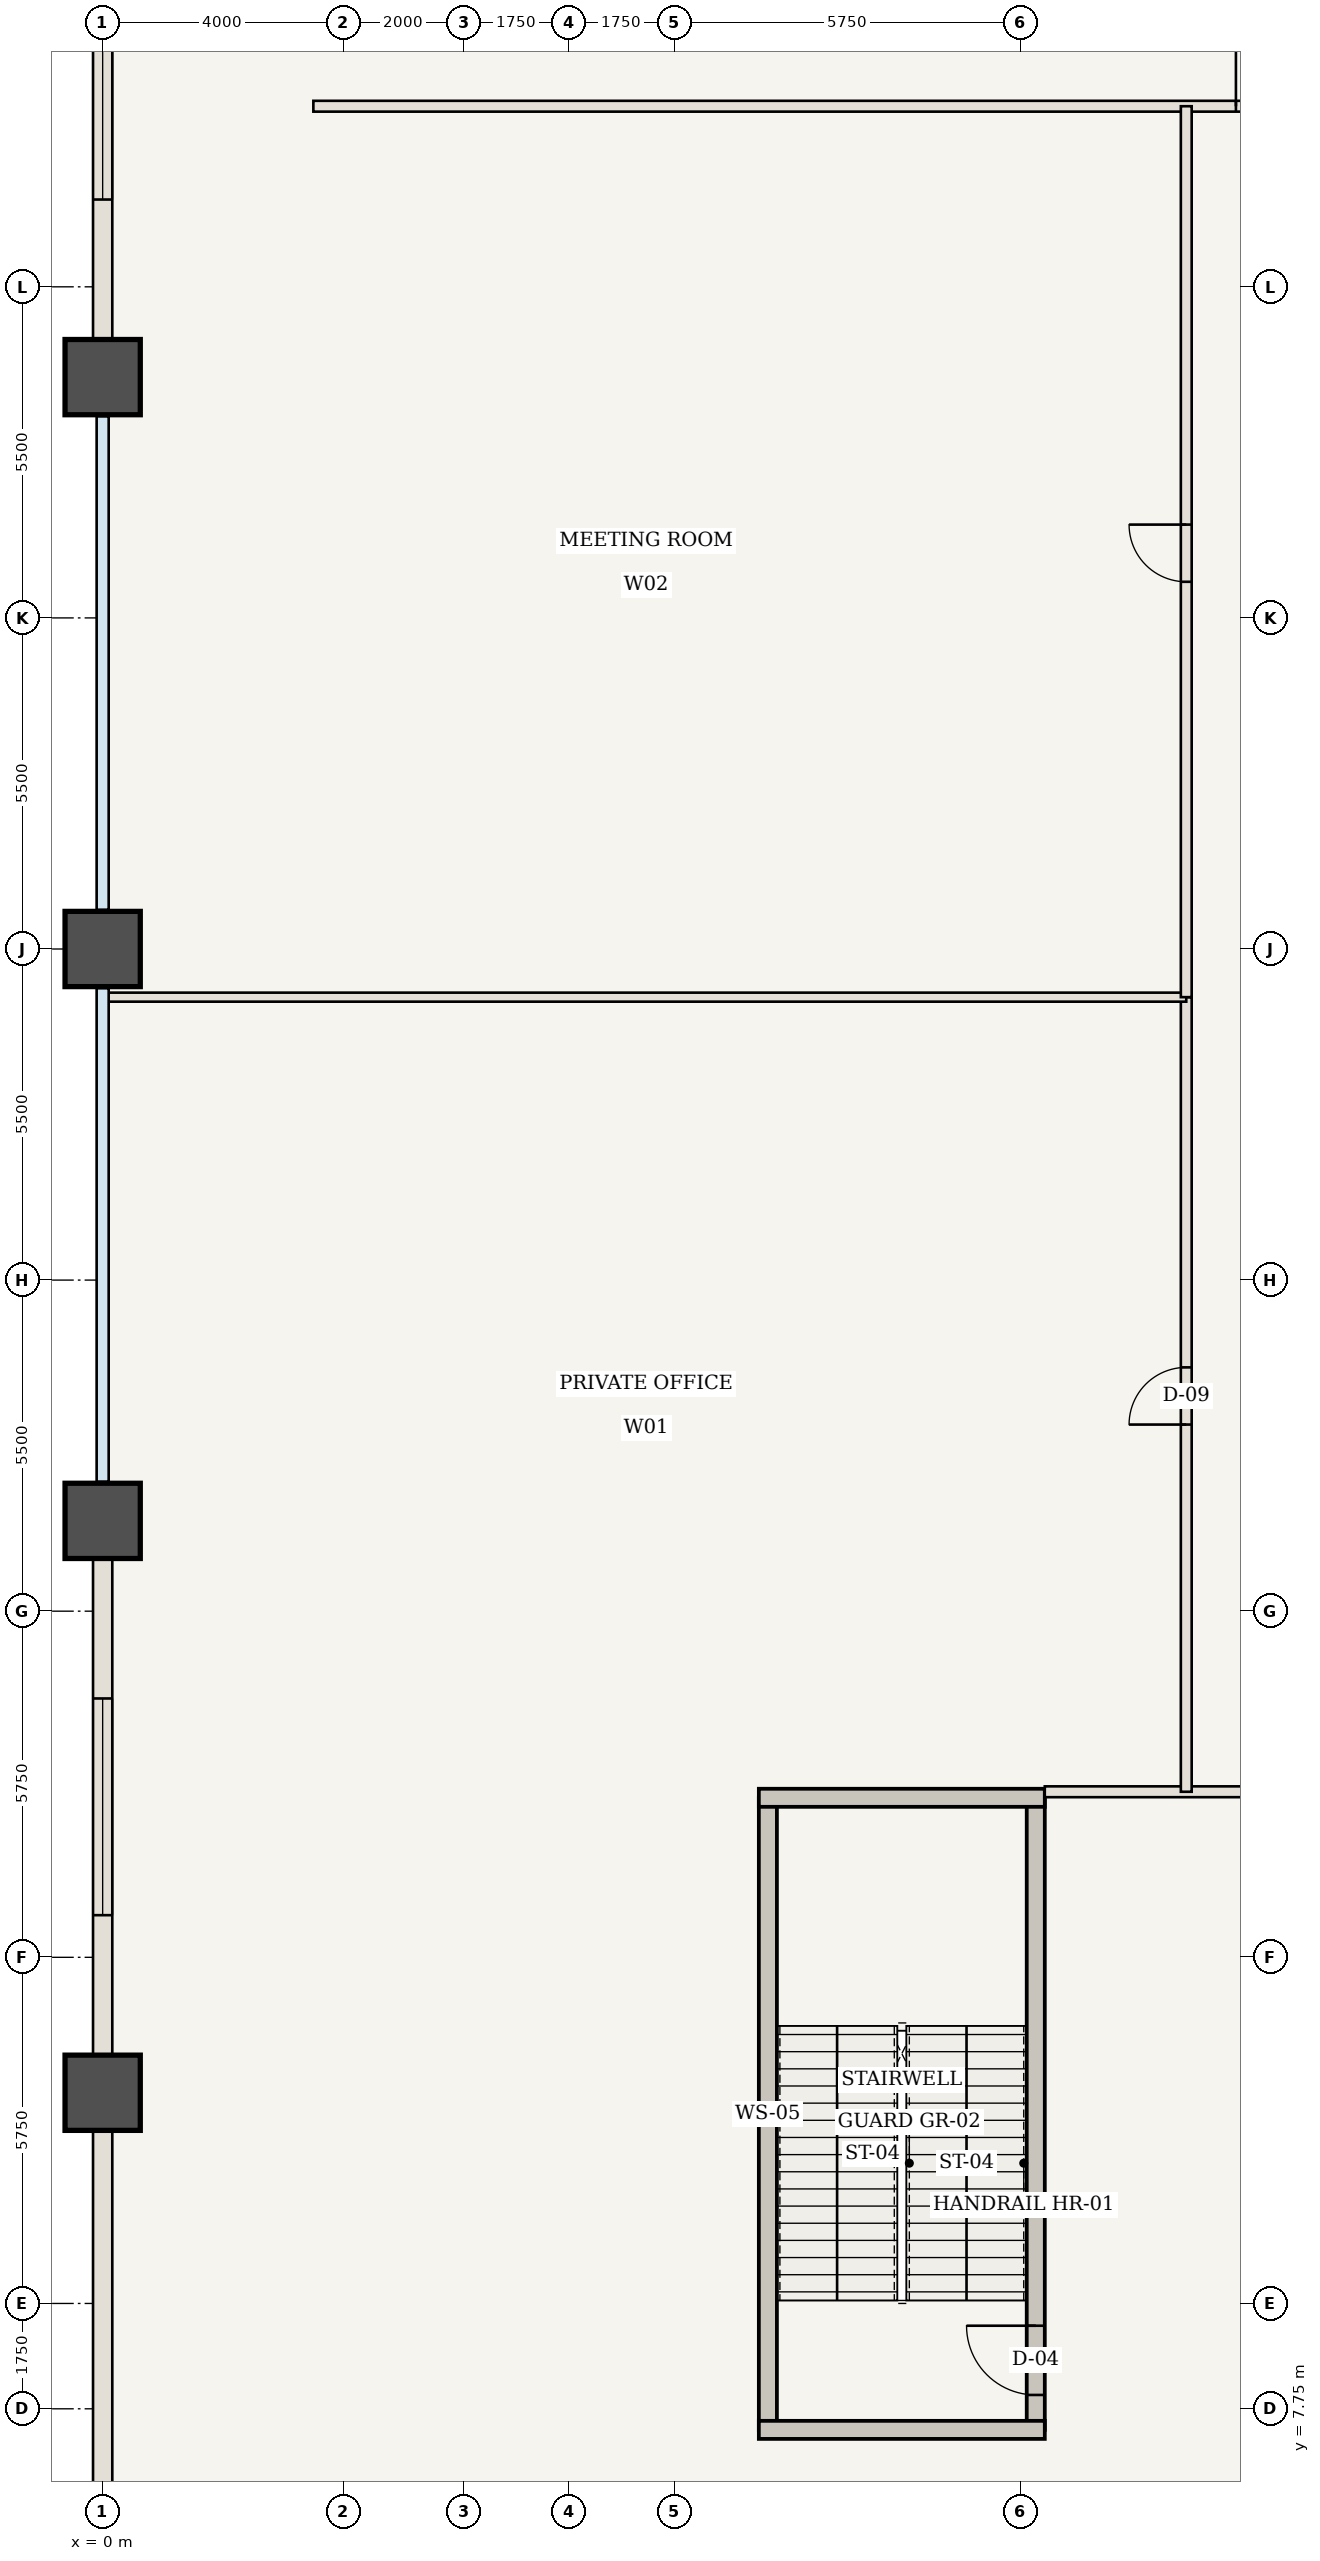
"""IFC4 building model, lengths in metres.
Left out: names, types, materials, properties, quantities, classifications, styles, units other than length and angle.
Written with IfcOpenShell. Run it as: python <this file> out.ifc"""

import sys

from ifc_helpers import new_model, si_unit, direction, frame, frame_2d, origin, origin_2d, place, context, subcontext, project, spatial, rectangle, extrude, element, fill, save


model = new_model("IFC4")
c1 = context("Model", 3, precision=1e-05, world=origin(), true_north=direction((0.0, 1.0)))
c2 = subcontext(c1, "Body", "Model", "MODEL_VIEW")
j1 = project(units=[si_unit("LENGTHUNIT", "METRE"), si_unit("PLANEANGLEUNIT", "RADIAN")], contexts=[c1])
p1 = place(None, origin())
s1 = spatial("IfcSite", under=j1, at=p1, CompositionType="ELEMENT")
p2 = place(p1, origin())
s2 = spatial("IfcBuilding", under=s1, at=p2, CompositionType="ELEMENT")
p3 = place(p2, frame((0.0, 0.0, 17.85)))
s3 = spatial("IfcBuildingStorey", under=s2, at=p3, CompositionType="ELEMENT", Elevation=17.85)
for number, where, z_axis, x_axis in (
    (1, (0.0, 13.0, 0.0), (0.0, 0.0, 1.0), (1.0, 0.0, 0.0)),
    (2, (0.0, 22.5, 0.0), (0.0, 0.0, 1.0), (1.0, 0.0, 0.0)),
    (3, (0.0, 32.0, 0.0), (0.0, 0.0, 1.0), (1.0, 0.0, 0.0)),
    (4, (0.0, 41.5, 0.0), (0.0, 0.0, 1.0), (1.0, 0.0, 0.0)),
):
    element("IfcColumn", number, at=place(p3, frame(where, z_axis=z_axis, x_axis=x_axis)), inside=s3, PredefinedType="COLUMN", context=c2, shape_type="SweptSolid", body=[
        extrude(rectangle(XDim=1.25, YDim=1.25, at=origin_2d()), origin(), (0.0, 0.0, 1.0), 5.95),
    ])
p4 = place(p3, frame((11.05, 7.4, 0.0), z_axis=(0.0, 0.0, 1.0), x_axis=(0.0, 1.0, 0.0)))
e5 = element("IfcWall", 5, at=p4, inside=s3, PredefinedType="SHEAR", context=c2, shape_type="SweptSolid", body=[
    extrude(rectangle(XDim=10.5, YDim=0.3, at=frame_2d((5.25, 0.0))), origin(), (0.0, 0.0, 1.0), 5.71),
])
p5 = place(p3, frame((15.5, 7.4, 0.0), z_axis=(0.0, 0.0, 1.0), x_axis=(0.0, 1.0, 0.0)))
e6 = element("IfcWall", 6, at=p5, inside=s3, PredefinedType="SHEAR", context=c2, shape_type="SweptSolid", body=[
    extrude(rectangle(XDim=10.5, YDim=0.3, at=frame_2d((5.25, 0.0))), origin(), (0.0, 0.0, 1.0), 5.71),
])
p6 = place(p5, frame((0.58, 0.0, 0.0)))
e7 = element("IfcOpeningElement", 7, at=p6, cuts=e6, PredefinedType="OPENING", context=c2, shape_type="SweptSolid", body=[
    extrude(rectangle(XDim=1.15, YDim=2.15, at=frame_2d((0.575, 1.075))), frame((0.0, 0.16, 0.0), z_axis=(0.0, -1.0, 0.0), x_axis=(1.0, 0.0, 0.0)), (0.0, 0.0, 1.0), 0.32),
])
for number, where, z_axis, x_axis in (
    (8, (10.9, 7.4, 0.0), (0.0, 0.0, 1.0), (1.0, 0.0, 0.0)),
    (9, (10.9, 17.9, 0.0), (0.0, 0.0, 1.0), (1.0, 0.0, 0.0)),
):
    element("IfcWall", number, at=place(p3, frame(where, z_axis=z_axis, x_axis=x_axis)), inside=s3, PredefinedType="SHEAR", context=c2, shape_type="SweptSolid", body=[
        extrude(rectangle(XDim=4.75, YDim=0.3, at=frame_2d((2.375, 0.0))), origin(), (0.0, 0.0, 1.0), 5.71),
    ])
p7 = place(p3, frame((15.65, 18.0, 0.0), z_axis=(0.0, 0.0, 1.0), x_axis=(1.0, 0.0, 0.0)))
e10 = element("IfcWall", 10, at=p7, inside=s3, PredefinedType="STANDARD", context=c2, shape_type="SweptSolid", body=[
    extrude(rectangle(XDim=25.85, YDim=0.18, at=frame_2d((12.925, 0.0))), origin(), (0.0, 0.0, 1.0), 5.71),
])
p8 = place(p7, frame((15.075, 0.0, 0.0)))
e11 = element("IfcOpeningElement", 11, at=p8, cuts=e10, PredefinedType="OPENING", context=c2, shape_type="SweptSolid", body=[
    extrude(rectangle(XDim=1.8, YDim=2.35, at=frame_2d((0.9, 1.175))), frame((0.0, 0.1, 0.0), z_axis=(0.0, -1.0, 0.0), x_axis=(1.0, 0.0, 0.0)), (0.0, 0.0, 1.0), 0.2),
])
p9 = place(p3, frame((3.5, 46.0, 0.0), z_axis=(0.0, 0.0, 1.0), x_axis=(1.0, 0.0, 0.0)))
e12 = element("IfcWall", 12, at=p9, inside=s3, PredefinedType="STANDARD", context=c2, shape_type="SweptSolid", body=[
    extrude(rectangle(XDim=20.0, YDim=0.18, at=frame_2d((10.0, 0.0))), origin(), (0.0, 0.0, 1.0), 5.71),
])
p10 = place(p9, frame((15.325, 0.0, 0.0)))
e13 = element("IfcOpeningElement", 13, at=p10, cuts=e12, PredefinedType="OPENING", context=c2, shape_type="SweptSolid", body=[
    extrude(rectangle(XDim=1.8, YDim=2.35, at=frame_2d((0.9, 1.175))), frame((0.0, 0.1, 0.0), z_axis=(0.0, -1.0, 0.0), x_axis=(1.0, 0.0, 0.0)), (0.0, 0.0, 1.0), 0.2),
])
p11 = place(p3, frame((18.0, 18.0, 0.0), z_axis=(0.0, 0.0, 1.0), x_axis=(0.0, 1.0, 0.0)))
e14 = element("IfcWall", 14, at=p11, inside=s3, PredefinedType="STANDARD", context=c2, shape_type="SweptSolid", body=[
    extrude(rectangle(XDim=13.2, YDim=0.18, at=frame_2d((6.6, 0.0))), origin(), (0.0, 0.0, 1.0), 5.71),
])
p12 = place(p11, frame((6.1, 0.0, 0.0)))
e15 = element("IfcOpeningElement", 15, at=p12, cuts=e14, PredefinedType="OPENING", context=c2, shape_type="SweptSolid", body=[
    extrude(rectangle(XDim=0.95, YDim=2.15, at=frame_2d((0.475, 1.075))), frame((0.0, 0.1, 0.0), z_axis=(0.0, -1.0, 0.0), x_axis=(1.0, 0.0, 0.0)), (0.0, 0.0, 1.0), 0.2),
])
p13 = place(p3, frame((0.06, 31.2, 0.0), z_axis=(0.0, 0.0, 1.0), x_axis=(1.0, 0.0, 0.0)))
e16 = element("IfcWall", 16, at=p13, inside=s3, PredefinedType="STANDARD", context=c2, shape_type="SweptSolid", body=[
    extrude(rectangle(XDim=17.94, YDim=0.15, at=frame_2d((8.97, 0.0))), origin(), (0.0, 0.0, 1.0), 5.71),
])
p14 = place(p3, frame((18.0, 31.2, 0.0), z_axis=(0.0, 0.0, 1.0), x_axis=(0.0, 1.0, 0.0)))
e17 = element("IfcWall", 17, at=p14, inside=s3, PredefinedType="STANDARD", context=c2, shape_type="SweptSolid", body=[
    extrude(rectangle(XDim=14.8, YDim=0.18, at=frame_2d((7.4, 0.0))), origin(), (0.0, 0.0, 1.0), 5.71),
])
p15 = place(p14, frame((6.9, 0.0, 0.0)))
e18 = element("IfcOpeningElement", 18, at=p15, cuts=e17, PredefinedType="OPENING", context=c2, shape_type="SweptSolid", body=[
    extrude(rectangle(XDim=0.95, YDim=2.15, at=frame_2d((0.475, 1.075))), frame((0.0, 0.1, 0.0), z_axis=(0.0, -1.0, 0.0), x_axis=(1.0, 0.0, 0.0)), (0.0, 0.0, 1.0), 0.2),
])
p16 = place(p3, frame((0.0, 3.5, 0.0), z_axis=(0.0, 0.0, 1.0), x_axis=(0.0, 1.0, 0.0)))
e19 = element("IfcWall", 19, at=p16, inside=s3, PredefinedType="USERDEFINED", context=c2, shape_type="SweptSolid", body=[
    extrude(rectangle(XDim=9.5, YDim=0.32, at=frame_2d((4.75, 0.0))), origin(), (0.0, 0.0, 1.0), 4.81),
])
p17 = place(p3, frame((0.0, 13.0, 0.0), z_axis=(0.0, 0.0, 1.0), x_axis=(0.0, 1.0, 0.0)))
e20 = element("IfcWall", 20, at=p17, inside=s3, PredefinedType="USERDEFINED", context=c2, shape_type="SweptSolid", body=[
    extrude(rectangle(XDim=9.5, YDim=0.32, at=frame_2d((4.75, 0.0))), origin(), (0.0, 0.0, 1.0), 4.81),
])
p18 = place(p17, frame((2.95, 0.0, 0.85)))
e21 = element("IfcOpeningElement", 21, at=p18, cuts=e20, PredefinedType="OPENING", context=c2, shape_type="SweptSolid", body=[
    extrude(rectangle(XDim=3.6, YDim=2.6, at=frame_2d((1.8, 1.3))), frame((0.0, 0.17, 0.0), z_axis=(0.0, -1.0, 0.0), x_axis=(1.0, 0.0, 0.0)), (0.0, 0.0, 1.0), 0.34),
])
p19 = place(p3, frame((0.0, 41.5, 0.0), z_axis=(0.0, 0.0, 1.0), x_axis=(0.0, 1.0, 0.0)))
e22 = element("IfcWall", 22, at=p19, inside=s3, PredefinedType="USERDEFINED", context=c2, shape_type="SweptSolid", body=[
    extrude(rectangle(XDim=9.5, YDim=0.32, at=frame_2d((4.75, 0.0))), origin(), (0.0, 0.0, 1.0), 4.81),
])
p20 = place(p19, frame((2.95, 0.0, 0.85)))
e23 = element("IfcOpeningElement", 23, at=p20, cuts=e22, PredefinedType="OPENING", context=c2, shape_type="SweptSolid", body=[
    extrude(rectangle(XDim=3.6, YDim=2.6, at=frame_2d((1.8, 1.3))), frame((0.0, 0.17, 0.0), z_axis=(0.0, -1.0, 0.0), x_axis=(1.0, 0.0, 0.0)), (0.0, 0.0, 1.0), 0.34),
])
p21 = place(p6, origin())
e24 = element("IfcDoor", 24, at=p21, inside=s3, OperationType="SINGLE_SWING_RIGHT", PredefinedType="DOOR", context=c2, shape_type="SweptSolid", body=[
    extrude(rectangle(XDim=1.15, YDim=2.15, at=frame_2d((0.575, 1.075))), frame((0.0, 0.025, 0.0), z_axis=(0.0, -1.0, 0.0), x_axis=(1.0, 0.0, 0.0)), (0.0, 0.0, 1.0), 0.05),
])
fill(e7, e24)
p22 = place(p10, origin())
e25 = element("IfcDoor", 25, at=p22, inside=s3, OperationType="SINGLE_SWING_LEFT", PredefinedType="DOOR", context=c2, shape_type="SweptSolid", body=[
    extrude(rectangle(XDim=1.8, YDim=2.35, at=frame_2d((0.9, 1.175))), frame((0.0, 0.025, 0.0), z_axis=(0.0, -1.0, 0.0), x_axis=(1.0, 0.0, 0.0)), (0.0, 0.0, 1.0), 0.05),
])
fill(e13, e25)
p23 = place(p12, origin())
e26 = element("IfcDoor", 26, at=p23, inside=s3, OperationType="SINGLE_SWING_LEFT", PredefinedType="DOOR", context=c2, shape_type="SweptSolid", body=[
    extrude(rectangle(XDim=0.95, YDim=2.15, at=frame_2d((0.475, 1.075))), frame((0.0, 0.025, 0.0), z_axis=(0.0, -1.0, 0.0), x_axis=(1.0, 0.0, 0.0)), (0.0, 0.0, 1.0), 0.05),
])
fill(e15, e26)
p24 = place(p15, origin())
e27 = element("IfcDoor", 27, at=p24, inside=s3, OperationType="SINGLE_SWING_RIGHT", PredefinedType="DOOR", context=c2, shape_type="SweptSolid", body=[
    extrude(rectangle(XDim=0.95, YDim=2.15, at=frame_2d((0.475, 1.075))), frame((0.0, 0.025, 0.0), z_axis=(0.0, -1.0, 0.0), x_axis=(1.0, 0.0, 0.0)), (0.0, 0.0, 1.0), 0.05),
])
fill(e18, e27)
p25 = place(p18, origin())
e28 = element("IfcWindow", 28, at=p25, inside=s3, PartitioningType="SINGLE_PANEL", PredefinedType="WINDOW", context=c2, shape_type="SweptSolid", body=[
    extrude(rectangle(XDim=3.6, YDim=2.6, at=frame_2d((1.8, 1.3))), frame((0.0, 0.03, 0.0), z_axis=(0.0, -1.0, 0.0), x_axis=(1.0, 0.0, 0.0)), (0.0, 0.0, 1.0), 0.06),
])
fill(e21, e28)
p26 = place(p20, origin())
e29 = element("IfcWindow", 29, at=p26, inside=s3, PartitioningType="SINGLE_PANEL", PredefinedType="WINDOW", context=c2, shape_type="SweptSolid", body=[
    extrude(rectangle(XDim=3.6, YDim=2.6, at=frame_2d((1.8, 1.3))), frame((0.0, 0.03, 0.0), z_axis=(0.0, -1.0, 0.0), x_axis=(1.0, 0.0, 0.0)), (0.0, 0.0, 1.0), 0.06),
])
fill(e23, e29)
save(model, sys.argv[1])
